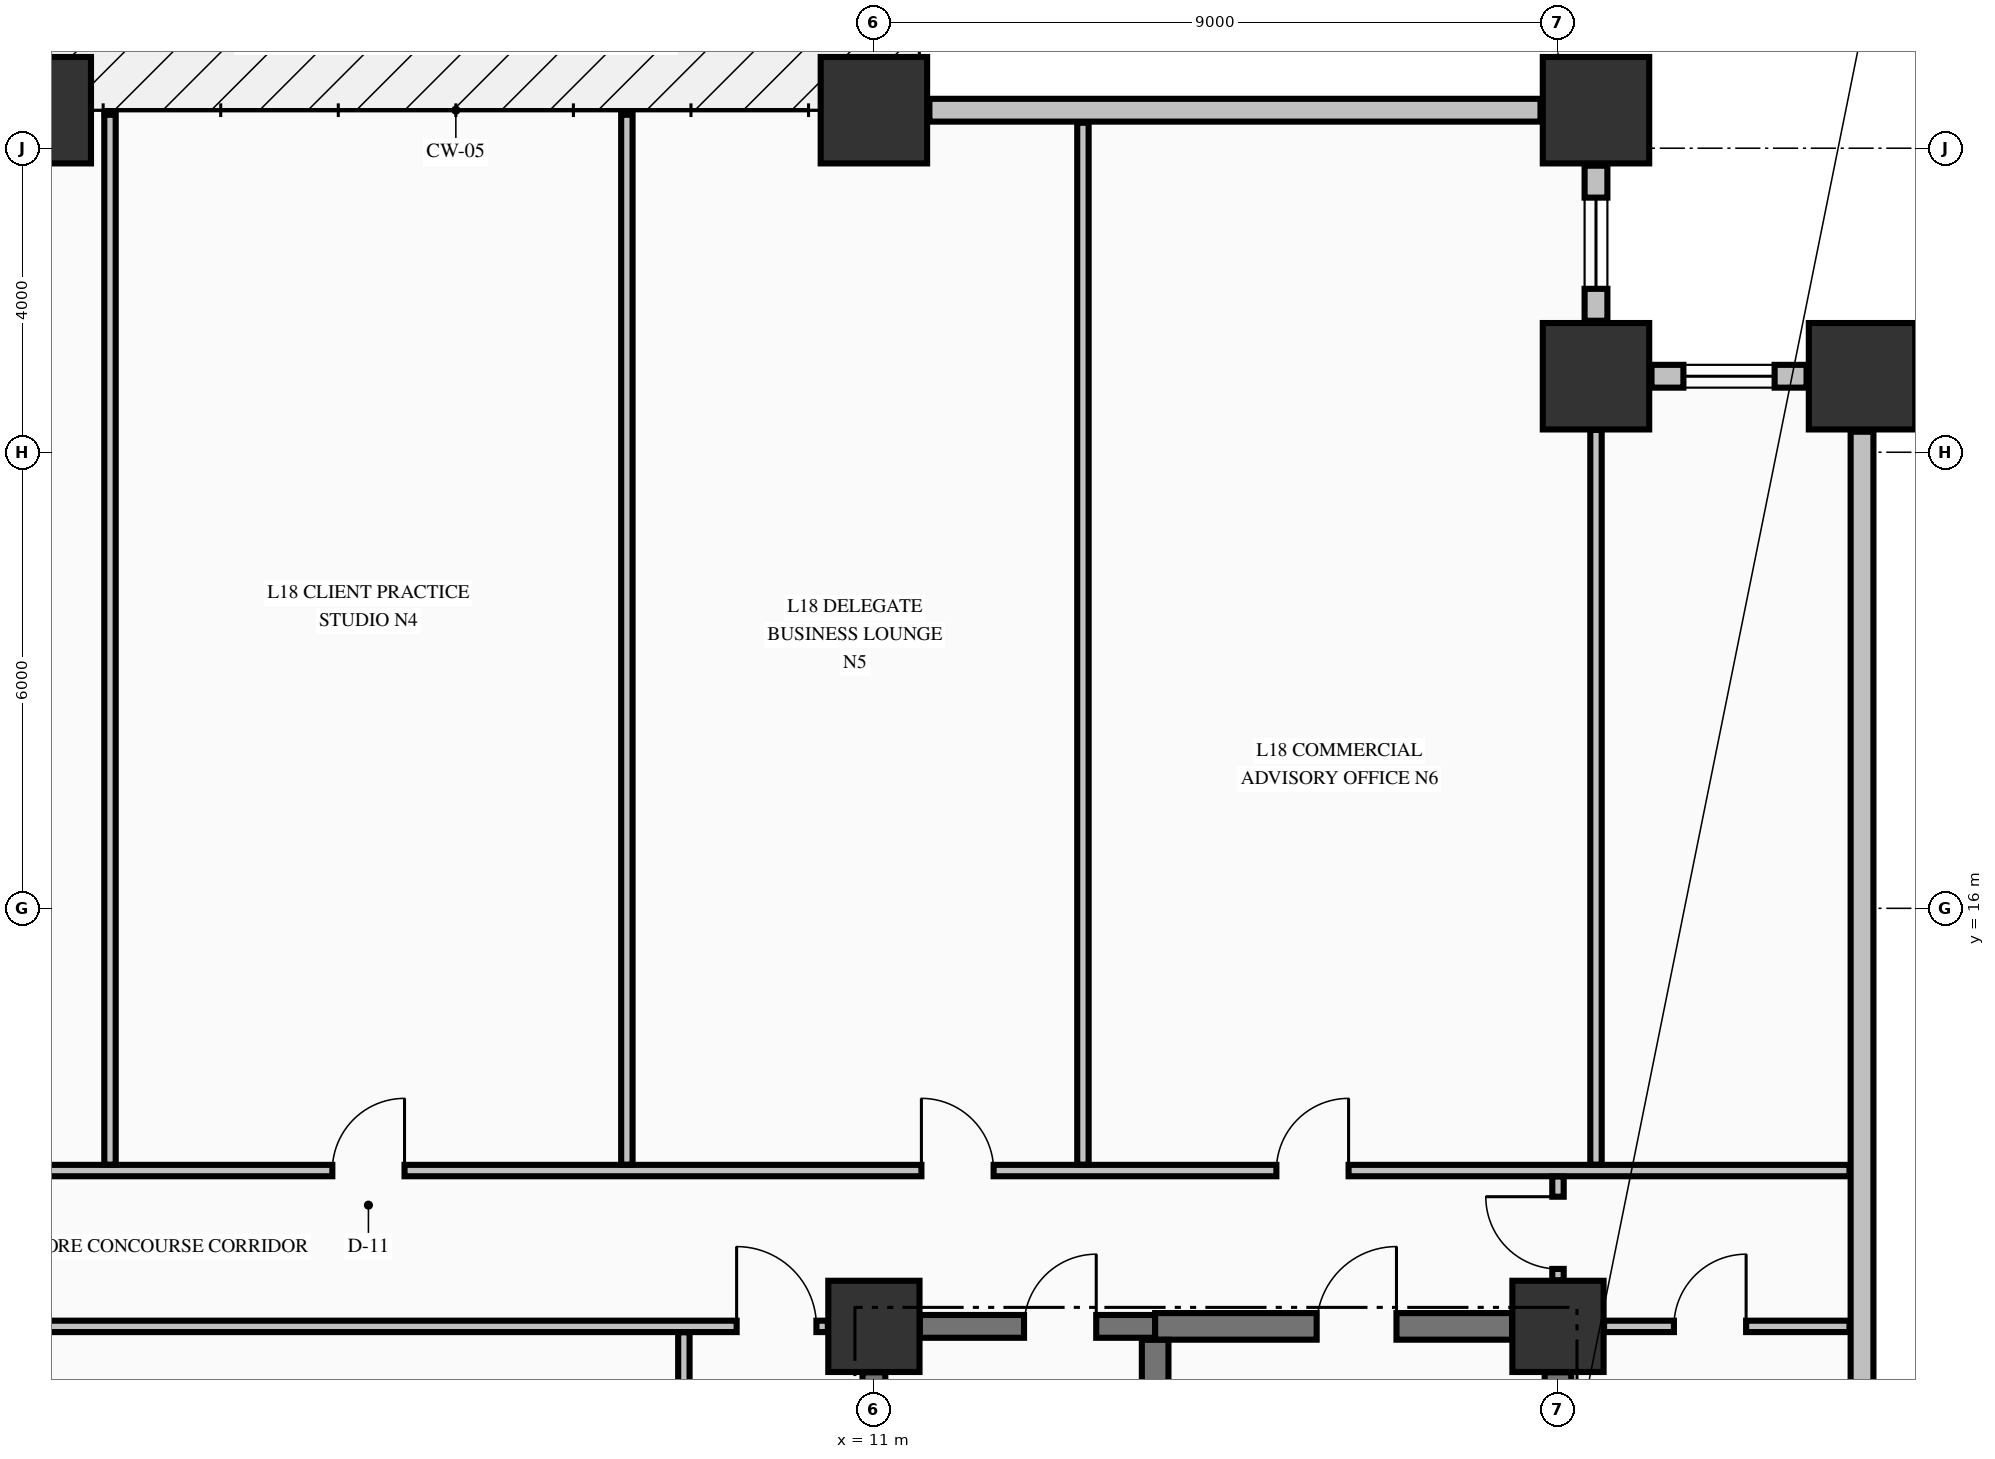
"""IFC4 building model, lengths in metres.
Left out: names, types, materials, properties, quantities, classifications, styles, units other than length and angle.
Written with IfcOpenShell. Run it as: python <this file> out.ifc"""

import sys

from ifc_helpers import new_model, si_unit, direction, frame, frame_2d, origin, origin_2d, place, context, subcontext, project, spatial, rectangle, extrude, element, fill, save


model = new_model("IFC4")
c1 = context("Model", 3, precision=1e-05, world=origin(), true_north=direction((0.0, 1.0)))
c2 = subcontext(c1, "Body", "Model", "MODEL_VIEW")
j1 = project(units=[si_unit("LENGTHUNIT", "METRE"), si_unit("PLANEANGLEUNIT", "RADIAN")], contexts=[c1])
p1 = place(None, origin())
s1 = spatial("IfcSite", under=j1, at=p1, CompositionType="ELEMENT")
p2 = place(p1, origin())
s2 = spatial("IfcBuilding", under=s1, at=p2, CompositionType="ELEMENT")
p3 = place(p2, frame((0.0, 0.0, 75.04)))
s3 = spatial("IfcBuildingStorey", under=s2, at=p3, CompositionType="ELEMENT", Elevation=75.04)
for number, where, z_axis, x_axis in (
    (1, (0.0, 26.5, -0.25), (0.0, 0.0, 1.0), (1.0, 0.0, 0.0)),
    (2, (11.0, 26.5, -0.25), (0.0, 0.0, 1.0), (1.0, 0.0, 0.0)),
    (3, (20.5, 26.5, -0.25), (0.0, 0.0, 1.0), (1.0, 0.0, 0.0)),
    (4, (24.0, 23.0, -0.25), (0.0, 0.0, 1.0), (1.0, 0.0, 0.0)),
    (5, (20.5, 23.0, -0.25), (0.0, 0.0, 1.0), (1.0, 0.0, 0.0)),
):
    element("IfcColumn", number, at=place(p3, frame(where, z_axis=z_axis, x_axis=x_axis)), inside=s3, PredefinedType="COLUMN", context=c2, shape_type="SweptSolid", body=[
        extrude(rectangle(XDim=1.4, YDim=1.4, at=origin_2d()), origin(), (0.0, 0.0, 1.0), 3.57),
    ])
for number, where, z_axis, x_axis in (
    (6, (11.0, 10.5, -0.25), (0.0, 0.0, 1.0), (1.0, 0.0, 0.0)),
    (7, (20.0, 10.5, -0.25), (0.0, 0.0, 1.0), (1.0, 0.0, 0.0)),
):
    element("IfcColumn", number, at=place(p3, frame(where, z_axis=z_axis, x_axis=x_axis)), inside=s3, PredefinedType="COLUMN", context=c2, shape_type="SweptSolid", body=[
        extrude(rectangle(XDim=1.2, YDim=1.2, at=origin_2d()), origin(), (0.0, 0.0, 1.0), 3.57),
    ])
p4 = place(p3, frame((23.27, 23.0, 0.0), z_axis=(0.0, 0.0, 1.0), x_axis=(-1.0, 0.0, 0.0)))
e8 = element("IfcWall", 8, at=p4, inside=s3, PredefinedType="STANDARD", context=c2, shape_type="SweptSolid", body=[
    extrude(rectangle(XDim=2.04, YDim=0.3, at=frame_2d((1.02, 0.0))), origin(), (0.0, 0.0, 1.0), 2.712),
])
p5 = place(p4, frame((0.42, 0.0, 0.82)))
e9 = element("IfcOpeningElement", 9, at=p5, cuts=e8, PredefinedType="OPENING", context=c2, shape_type="SweptSolid", body=[
    extrude(rectangle(XDim=1.2, YDim=1.65, at=frame_2d((0.6, 0.825))), frame((0.0, 0.16, 0.0), z_axis=(0.0, -1.0, 0.0), x_axis=(1.0, 0.0, 0.0)), (0.0, 0.0, 1.0), 0.32),
])
p6 = place(p3, frame((20.5, 23.73, 0.0), z_axis=(0.0, 0.0, 1.0), x_axis=(0.0, 1.0, 0.0)))
e10 = element("IfcWall", 10, at=p6, inside=s3, PredefinedType="STANDARD", context=c2, shape_type="SweptSolid", body=[
    extrude(rectangle(XDim=2.04, YDim=0.3, at=frame_2d((1.02, 0.0))), origin(), (0.0, 0.0, 1.0), 2.712),
])
p7 = place(p6, frame((0.42, 0.0, 0.82)))
e11 = element("IfcOpeningElement", 11, at=p7, cuts=e10, PredefinedType="OPENING", context=c2, shape_type="SweptSolid", body=[
    extrude(rectangle(XDim=1.2, YDim=1.65, at=frame_2d((0.6, 0.825))), frame((0.0, 0.16, 0.0), z_axis=(0.0, -1.0, 0.0), x_axis=(1.0, 0.0, 0.0)), (0.0, 0.0, 1.0), 0.32),
])
p8 = place(p3, frame((19.77, 26.5, 0.0), z_axis=(0.0, 0.0, 1.0), x_axis=(-1.0, 0.0, 0.0)))
e12 = element("IfcWall", 12, at=p8, inside=s3, PredefinedType="STANDARD", context=c2, shape_type="SweptSolid", body=[
    extrude(rectangle(XDim=8.04, YDim=0.3, at=frame_2d((4.02, 0.0))), origin(), (0.0, 0.0, 1.0), 2.712),
])
p9 = place(p3, frame((24.0, 9.73, 0.0), z_axis=(0.0, 0.0, 1.0), x_axis=(0.0, 1.0, 0.0)))
e13 = element("IfcWall", 13, at=p9, inside=s3, PredefinedType="STANDARD", context=c2, shape_type="SweptSolid", body=[
    extrude(rectangle(XDim=12.54, YDim=0.3, at=frame_2d((6.27, 0.0))), origin(), (0.0, 0.0, 1.0), 2.712),
])
p10 = place(p3, frame((11.604, 10.5, 0.0), z_axis=(0.0, 0.0, 1.0), x_axis=(1.0, 0.0, 0.0)))
e14 = element("IfcWall", 14, at=p10, inside=s3, PredefinedType="SHEAR", context=c2, shape_type="SweptSolid", body=[
    extrude(rectangle(XDim=3.096, YDim=0.3, at=frame_2d((1.548, 0.0))), origin(), (0.0, 0.0, 1.0), 3.32),
])
p11 = place(p10, frame((1.371, 0.0, 0.0)))
e15 = element("IfcOpeningElement", 15, at=p11, cuts=e14, PredefinedType="OPENING", context=c2, shape_type="SweptSolid", body=[
    extrude(rectangle(XDim=0.95, YDim=2.15, at=frame_2d((0.475, 1.075))), frame((0.0, 0.16, 0.0), z_axis=(0.0, -1.0, 0.0), x_axis=(1.0, 0.0, 0.0)), (0.0, 0.0, 1.0), 0.32),
])
p12 = place(p3, frame((14.7, 10.5, 0.0), z_axis=(0.0, 0.0, 1.0), x_axis=(1.0, 0.0, 0.0)))
e16 = element("IfcWall", 16, at=p12, inside=s3, PredefinedType="SHEAR", context=c2, shape_type="SweptSolid", body=[
    extrude(rectangle(XDim=4.696, YDim=0.35, at=frame_2d((2.348, 0.0))), origin(), (0.0, 0.0, 1.0), 3.32),
])
p13 = place(p12, frame((2.125, 0.0, 0.0)))
e17 = element("IfcOpeningElement", 17, at=p13, cuts=e16, PredefinedType="OPENING", context=c2, shape_type="SweptSolid", body=[
    extrude(rectangle(XDim=1.05, YDim=2.15, at=frame_2d((0.525, 1.075))), frame((0.0, 0.185, 0.0), z_axis=(0.0, -1.0, 0.0), x_axis=(1.0, 0.0, 0.0)), (0.0, 0.0, 1.0), 0.37),
])
p14 = place(p3, frame((-10.394, 10.5, 0.0), z_axis=(0.0, 0.0, 1.0), x_axis=(1.0, 0.0, 0.0)))
e18 = element("IfcWall", 18, at=p14, inside=s3, PredefinedType="PARTITIONING", context=c2, shape_type="SweptSolid", body=[
    extrude(rectangle(XDim=20.788, YDim=0.15, at=frame_2d((10.394, 0.0))), origin(), (0.0, 0.0, 1.0), 3.32),
])
p15 = place(p14, frame((0.15, 0.0, 0.0)))
e19 = element("IfcOpeningElement", 19, at=p15, cuts=e18, PredefinedType="OPENING", context=c2, shape_type="SweptSolid", body=[
    extrude(rectangle(XDim=1.05, YDim=2.15, at=frame_2d((0.525, 1.075))), frame((0.0, 0.085, 0.0), z_axis=(0.0, -1.0, 0.0), x_axis=(1.0, 0.0, 0.0)), (0.0, 0.0, 1.0), 0.17),
])
p16 = place(p14, frame((19.588, 0.0, 0.0)))
e20 = element("IfcOpeningElement", 20, at=p16, cuts=e18, PredefinedType="OPENING", context=c2, shape_type="SweptSolid", body=[
    extrude(rectangle(XDim=1.05, YDim=2.15, at=frame_2d((0.525, 1.075))), frame((0.0, 0.085, 0.0), z_axis=(0.0, -1.0, 0.0), x_axis=(1.0, 0.0, 0.0)), (0.0, 0.0, 1.0), 0.17),
])
p17 = place(p3, frame((20.606, 10.5, 0.0), z_axis=(0.0, 0.0, 1.0), x_axis=(1.0, 0.0, 0.0)))
e21 = element("IfcWall", 21, at=p17, inside=s3, PredefinedType="PARTITIONING", context=c2, shape_type="SweptSolid", body=[
    extrude(rectangle(XDim=3.229, YDim=0.15, at=frame_2d((1.615, 0.0))), origin(), (0.0, 0.0, 1.0), 3.32),
])
p18 = place(p17, frame((0.919, 0.0, 0.0)))
e22 = element("IfcOpeningElement", 22, at=p18, cuts=e21, PredefinedType="OPENING", context=c2, shape_type="SweptSolid", body=[
    extrude(rectangle(XDim=0.95, YDim=2.15, at=frame_2d((0.475, 1.075))), frame((0.0, 0.085, 0.0), z_axis=(0.0, -1.0, 0.0), x_axis=(1.0, 0.0, 0.0)), (0.0, 0.0, 1.0), 0.17),
])
p19 = place(p3, frame((-28.835, 12.55, 0.0), z_axis=(0.0, 0.0, 1.0), x_axis=(1.0, 0.0, 0.0)))
e23 = element("IfcWall", 23, at=p19, inside=s3, PredefinedType="PARTITIONING", context=c2, shape_type="SweptSolid", body=[
    extrude(rectangle(XDim=52.67, YDim=0.15, at=frame_2d((26.335, 0.0))), origin(), (0.0, 0.0, 1.0), 3.32),
])
p20 = place(p19, frame((10.79, 0.0, 0.0)))
e24 = element("IfcOpeningElement", 24, at=p20, cuts=e23, PredefinedType="OPENING", context=c2, shape_type="SweptSolid", body=[
    extrude(rectangle(XDim=1.05, YDim=2.15, at=frame_2d((0.525, 1.075))), frame((0.0, 0.085, 0.0), z_axis=(0.0, -1.0, 0.0), x_axis=(1.0, 0.0, 0.0)), (0.0, 0.0, 1.0), 0.17),
])
p21 = place(p19, frame((18.46, 0.0, 0.0)))
e25 = element("IfcOpeningElement", 25, at=p21, cuts=e23, PredefinedType="OPENING", context=c2, shape_type="SweptSolid", body=[
    extrude(rectangle(XDim=0.95, YDim=2.15, at=frame_2d((0.475, 1.075))), frame((0.0, 0.085, 0.0), z_axis=(0.0, -1.0, 0.0), x_axis=(1.0, 0.0, 0.0)), (0.0, 0.0, 1.0), 0.17),
])
p22 = place(p19, frame((24.66, 0.0, 0.0)))
e26 = element("IfcOpeningElement", 26, at=p22, cuts=e23, PredefinedType="OPENING", context=c2, shape_type="SweptSolid", body=[
    extrude(rectangle(XDim=1.05, YDim=2.15, at=frame_2d((0.525, 1.075))), frame((0.0, 0.085, 0.0), z_axis=(0.0, -1.0, 0.0), x_axis=(1.0, 0.0, 0.0)), (0.0, 0.0, 1.0), 0.17),
])
p23 = place(p19, frame((32.71, 0.0, 0.0)))
e27 = element("IfcOpeningElement", 27, at=p23, cuts=e23, PredefinedType="OPENING", context=c2, shape_type="SweptSolid", body=[
    extrude(rectangle(XDim=0.95, YDim=2.15, at=frame_2d((0.475, 1.075))), frame((0.0, 0.085, 0.0), z_axis=(0.0, -1.0, 0.0), x_axis=(1.0, 0.0, 0.0)), (0.0, 0.0, 1.0), 0.17),
])
p24 = place(p19, frame((40.46, 0.0, 0.0)))
e28 = element("IfcOpeningElement", 28, at=p24, cuts=e23, PredefinedType="OPENING", context=c2, shape_type="SweptSolid", body=[
    extrude(rectangle(XDim=0.95, YDim=2.15, at=frame_2d((0.475, 1.075))), frame((0.0, 0.085, 0.0), z_axis=(0.0, -1.0, 0.0), x_axis=(1.0, 0.0, 0.0)), (0.0, 0.0, 1.0), 0.17),
])
p25 = place(p19, frame((45.13, 0.0, 0.0)))
e29 = element("IfcOpeningElement", 29, at=p25, cuts=e23, PredefinedType="OPENING", context=c2, shape_type="SweptSolid", body=[
    extrude(rectangle(XDim=0.95, YDim=2.15, at=frame_2d((0.475, 1.075))), frame((0.0, 0.085, 0.0), z_axis=(0.0, -1.0, 0.0), x_axis=(1.0, 0.0, 0.0)), (0.0, 0.0, 1.0), 0.17),
])
p26 = place(p3, frame((11.0, 5.852, 0.0), z_axis=(0.0, 0.0, 1.0), x_axis=(0.0, 1.0, 0.0)))
e30 = element("IfcWall", 30, at=p26, inside=s3, PredefinedType="SHEAR", context=c2, shape_type="SweptSolid", body=[
    extrude(rectangle(XDim=4.044, YDim=0.3, at=frame_2d((2.022, 0.0))), origin(), (0.0, 0.0, 1.0), 3.32),
])
p27 = place(p3, frame((14.7, 5.852, 0.0), z_axis=(0.0, 0.0, 1.0), x_axis=(0.0, 1.0, 0.0)))
e31 = element("IfcWall", 31, at=p27, inside=s3, PredefinedType="SHEAR", context=c2, shape_type="SweptSolid", body=[
    extrude(rectangle(XDim=4.471, YDim=0.35, at=frame_2d((2.235, 0.0))), origin(), (0.0, 0.0, 1.0), 3.32),
])
p28 = place(p3, frame((20.0, 0.604, 0.0), z_axis=(0.0, 0.0, 1.0), x_axis=(0.0, 1.0, 0.0)))
e32 = element("IfcWall", 32, at=p28, inside=s3, PredefinedType="SHEAR", context=c2, shape_type="SweptSolid", body=[
    extrude(rectangle(XDim=9.292, YDim=0.35, at=frame_2d((4.646, 0.0))), origin(), (0.0, 0.0, 1.0), 3.32),
])
for number, where, z_axis, x_axis in (
    (33, (0.95, 12.628, 0.0), (0.0, 0.0, 1.0), (0.0, 1.0, 0.0)),
    (34, (7.75, 12.628, 0.0), (0.0, 0.0, 1.0), (0.0, 1.0, 0.0)),
):
    element("IfcWall", number, at=place(p3, frame(where, z_axis=z_axis, x_axis=x_axis)), inside=s3, PredefinedType="PARTITIONING", context=c2, shape_type="SweptSolid", body=[
        extrude(rectangle(XDim=13.812, YDim=0.15, at=frame_2d((6.906, 0.0))), origin(), (0.0, 0.0, 1.0), 3.32),
    ])
p29 = place(p3, frame((8.5, 0.303, 0.0), z_axis=(0.0, 0.0, 1.0), x_axis=(0.0, 1.0, 0.0)))
e35 = element("IfcWall", 35, at=p29, inside=s3, PredefinedType="PARTITIONING", context=c2, shape_type="SweptSolid", body=[
    extrude(rectangle(XDim=10.119, YDim=0.15, at=frame_2d((5.06, 0.0))), origin(), (0.0, 0.0, 1.0), 3.32),
])
p30 = place(p29, frame((4.497, 0.0, 0.0)))
e36 = element("IfcOpeningElement", 36, at=p30, cuts=e35, PredefinedType="OPENING", context=c2, shape_type="SweptSolid", body=[
    extrude(rectangle(XDim=1.1, YDim=2.15, at=frame_2d((0.55, 1.075))), frame((0.0, 0.085, 0.0), z_axis=(0.0, -1.0, 0.0), x_axis=(1.0, 0.0, 0.0)), (0.0, 0.0, 1.0), 0.17),
])
p31 = place(p3, frame((13.75, 12.628, 0.0), z_axis=(0.0, 0.0, 1.0), x_axis=(0.0, 1.0, 0.0)))
e37 = element("IfcWall", 37, at=p31, inside=s3, PredefinedType="PARTITIONING", context=c2, shape_type="SweptSolid", body=[
    extrude(rectangle(XDim=13.707, YDim=0.15, at=frame_2d((6.854, 0.0))), origin(), (0.0, 0.0, 1.0), 3.32),
])
p32 = place(p3, frame((20.0, 11.106, 0.0), z_axis=(0.0, 0.0, 1.0), x_axis=(0.0, 1.0, 0.0)))
e38 = element("IfcWall", 38, at=p32, inside=s3, PredefinedType="PARTITIONING", context=c2, shape_type="SweptSolid", body=[
    extrude(rectangle(XDim=1.366, YDim=0.15, at=frame_2d((0.683, 0.0))), origin(), (0.0, 0.0, 1.0), 3.32),
])
p33 = place(p32, frame((0.15, 0.0, 0.0)))
e39 = element("IfcOpeningElement", 39, at=p33, cuts=e38, PredefinedType="OPENING", context=c2, shape_type="SweptSolid", body=[
    extrude(rectangle(XDim=0.95, YDim=2.15, at=frame_2d((0.475, 1.075))), frame((0.0, 0.085, 0.0), z_axis=(0.0, -1.0, 0.0), x_axis=(1.0, 0.0, 0.0)), (0.0, 0.0, 1.0), 0.17),
])
p34 = place(p3, frame((20.5, 12.628, 0.0), z_axis=(0.0, 0.0, 1.0), x_axis=(0.0, 1.0, 0.0)))
e40 = element("IfcWall", 40, at=p34, inside=s3, PredefinedType="PARTITIONING", context=c2, shape_type="SweptSolid", body=[
    extrude(rectangle(XDim=9.666, YDim=0.15, at=frame_2d((4.833, 0.0))), origin(), (0.0, 0.0, 1.0), 3.32),
])
p35 = place(p5, origin())
e41 = element("IfcWindow", 41, at=p35, inside=s3, PartitioningType="SINGLE_PANEL", PredefinedType="WINDOW", context=c2, shape_type="SweptSolid", body=[
    extrude(rectangle(XDim=1.2, YDim=1.65, at=frame_2d((0.6, 0.825))), frame((0.0, 0.03, 0.0), z_axis=(0.0, -1.0, 0.0), x_axis=(1.0, 0.0, 0.0)), (0.0, 0.0, 1.0), 0.06),
])
fill(e9, e41)
p36 = place(p7, origin())
e42 = element("IfcWindow", 42, at=p36, inside=s3, PartitioningType="SINGLE_PANEL", PredefinedType="WINDOW", context=c2, shape_type="SweptSolid", body=[
    extrude(rectangle(XDim=1.2, YDim=1.65, at=frame_2d((0.6, 0.825))), frame((0.0, 0.03, 0.0), z_axis=(0.0, -1.0, 0.0), x_axis=(1.0, 0.0, 0.0)), (0.0, 0.0, 1.0), 0.06),
])
fill(e11, e42)
p37 = place(p11, origin())
e43 = element("IfcDoor", 43, at=p37, inside=s3, OperationType="SINGLE_SWING_RIGHT", PredefinedType="DOOR", context=c2, shape_type="SweptSolid", body=[
    extrude(rectangle(XDim=0.95, YDim=2.15, at=frame_2d((0.475, 1.075))), frame((0.0, 0.025, 0.0), z_axis=(0.0, -1.0, 0.0), x_axis=(1.0, 0.0, 0.0)), (0.0, 0.0, 1.0), 0.05),
])
fill(e15, e43)
p38 = place(p13, origin())
e44 = element("IfcDoor", 44, at=p38, inside=s3, OperationType="SINGLE_SWING_RIGHT", PredefinedType="DOOR", context=c2, shape_type="SweptSolid", body=[
    extrude(rectangle(XDim=1.05, YDim=2.15, at=frame_2d((0.525, 1.075))), frame((0.0, 0.025, 0.0), z_axis=(0.0, -1.0, 0.0), x_axis=(1.0, 0.0, 0.0)), (0.0, 0.0, 1.0), 0.05),
])
fill(e17, e44)
p39 = place(p16, origin())
e45 = element("IfcDoor", 45, at=p39, inside=s3, OperationType="SINGLE_SWING_LEFT", PredefinedType="DOOR", context=c2, shape_type="SweptSolid", body=[
    extrude(rectangle(XDim=1.05, YDim=2.15, at=frame_2d((0.525, 1.075))), frame((0.0, 0.025, 0.0), z_axis=(0.0, -1.0, 0.0), x_axis=(1.0, 0.0, 0.0)), (0.0, 0.0, 1.0), 0.05),
])
fill(e20, e45)
p40 = place(p23, origin())
e46 = element("IfcDoor", 46, at=p40, inside=s3, OperationType="SINGLE_SWING_RIGHT", PredefinedType="DOOR", context=c2, shape_type="SweptSolid", body=[
    extrude(rectangle(XDim=0.95, YDim=2.15, at=frame_2d((0.475, 1.075))), frame((0.0, 0.025, 0.0), z_axis=(0.0, -1.0, 0.0), x_axis=(1.0, 0.0, 0.0)), (0.0, 0.0, 1.0), 0.05),
])
fill(e27, e46)
p41 = place(p24, origin())
e47 = element("IfcDoor", 47, at=p41, inside=s3, OperationType="SINGLE_SWING_LEFT", PredefinedType="DOOR", context=c2, shape_type="SweptSolid", body=[
    extrude(rectangle(XDim=0.95, YDim=2.15, at=frame_2d((0.475, 1.075))), frame((0.0, 0.025, 0.0), z_axis=(0.0, -1.0, 0.0), x_axis=(1.0, 0.0, 0.0)), (0.0, 0.0, 1.0), 0.05),
])
fill(e28, e47)
p42 = place(p25, origin())
e48 = element("IfcDoor", 48, at=p42, inside=s3, OperationType="SINGLE_SWING_RIGHT", PredefinedType="DOOR", context=c2, shape_type="SweptSolid", body=[
    extrude(rectangle(XDim=0.95, YDim=2.15, at=frame_2d((0.475, 1.075))), frame((0.0, 0.025, 0.0), z_axis=(0.0, -1.0, 0.0), x_axis=(1.0, 0.0, 0.0)), (0.0, 0.0, 1.0), 0.05),
])
fill(e29, e48)
p43 = place(p33, origin())
e49 = element("IfcDoor", 49, at=p43, inside=s3, OperationType="SINGLE_SWING_RIGHT", PredefinedType="DOOR", context=c2, shape_type="SweptSolid", body=[
    extrude(rectangle(XDim=0.95, YDim=2.15, at=frame_2d((0.475, 1.075))), frame((0.0, 0.025, 0.0), z_axis=(0.0, -1.0, 0.0), x_axis=(1.0, 0.0, 0.0)), (0.0, 0.0, 1.0), 0.05),
])
fill(e39, e49)
p44 = place(p18, origin())
e50 = element("IfcDoor", 50, at=p44, inside=s3, OperationType="SINGLE_SWING_RIGHT", PredefinedType="DOOR", context=c2, shape_type="SweptSolid", body=[
    extrude(rectangle(XDim=0.95, YDim=2.15, at=frame_2d((0.475, 1.075))), frame((0.0, 0.025, 0.0), z_axis=(0.0, -1.0, 0.0), x_axis=(1.0, 0.0, 0.0)), (0.0, 0.0, 1.0), 0.05),
])
fill(e22, e50)
save(model, sys.argv[1])
